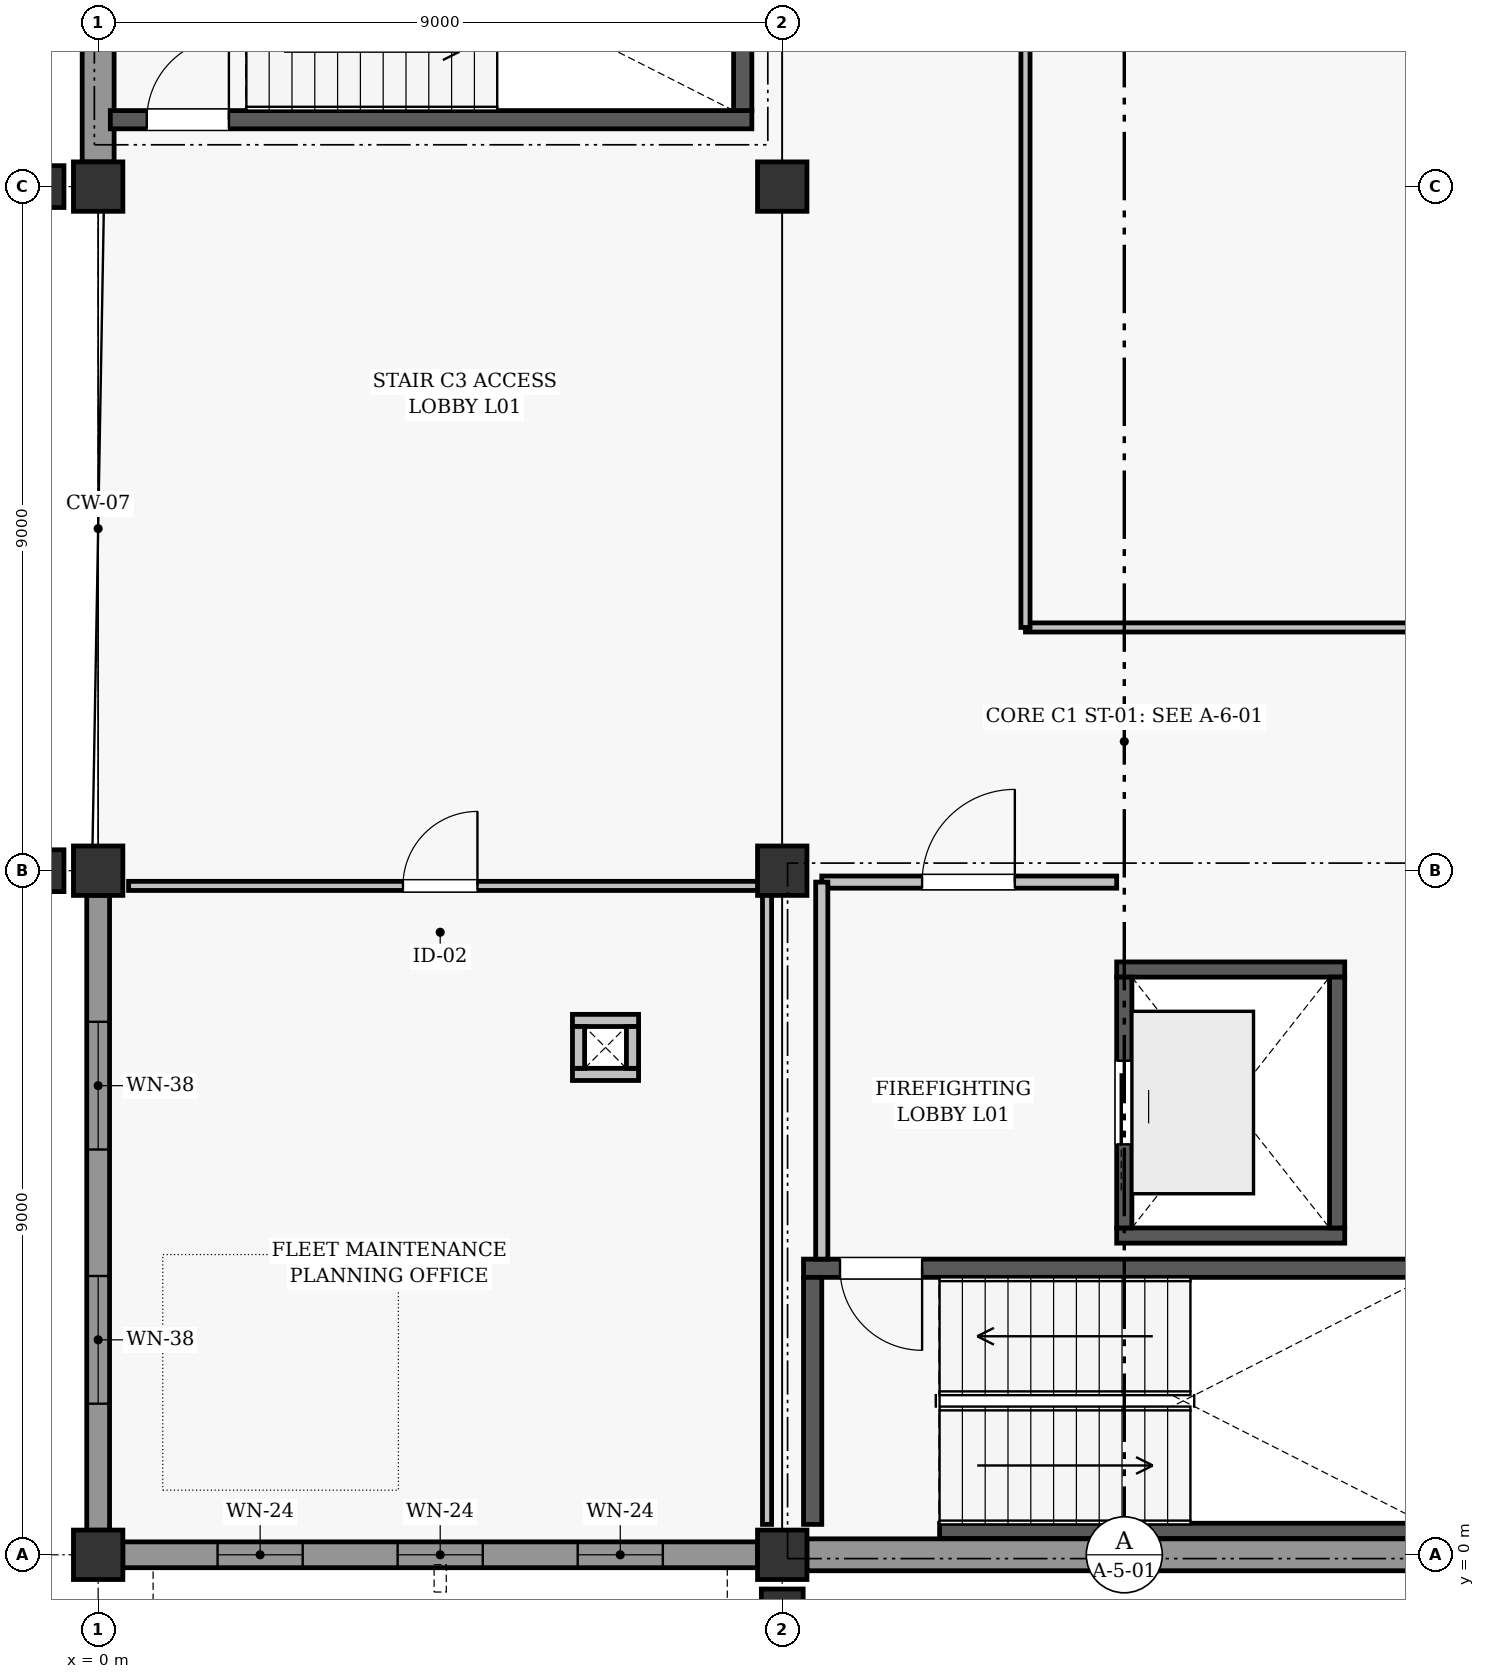
"""IFC4 building model, lengths in metres.
Left out: names, types, materials, properties, quantities, classifications, styles, units other than length and angle.
Written with IfcOpenShell. Run it as: python <this file> out.ifc"""

import sys

from ifc_helpers import new_model, si_unit, direction, frame, frame_2d, origin, origin_2d, place, context, subcontext, project, spatial, rectangle, extrude, element, fill, save


model = new_model("IFC4")
c1 = context("Model", 3, precision=1e-05, world=origin(), true_north=direction((0.0, 1.0)))
c2 = subcontext(c1, "Body", "Model", "MODEL_VIEW")
j1 = project(units=[si_unit("LENGTHUNIT", "METRE"), si_unit("PLANEANGLEUNIT", "RADIAN")], contexts=[c1])
p1 = place(None, origin())
s1 = spatial("IfcSite", under=j1, at=p1, CompositionType="ELEMENT")
p2 = place(p1, origin())
s2 = spatial("IfcBuilding", under=s1, at=p2, CompositionType="ELEMENT")
p3 = place(p2, frame((0.0, 0.0, 4.8)))
s3 = spatial("IfcBuildingStorey", under=s2, at=p3, CompositionType="ELEMENT", Elevation=4.8)
for number, where, z_axis, x_axis in (
    (1, (0.0, 0.0, 0.0), (0.0, 0.0, 1.0), (1.0, 0.0, 0.0)),
    (2, (0.0, 9.0, 0.0), (0.0, 0.0, 1.0), (1.0, 0.0, 0.0)),
    (3, (0.0, 18.0, 0.0), (0.0, 0.0, 1.0), (1.0, 0.0, 0.0)),
    (4, (9.0, 0.0, 0.0), (0.0, 0.0, 1.0), (1.0, 0.0, 0.0)),
    (5, (9.0, 9.0, 0.0), (0.0, 0.0, 1.0), (1.0, 0.0, 0.0)),
    (6, (9.0, 18.0, 0.0), (0.0, 0.0, 1.0), (1.0, 0.0, 0.0)),
):
    element("IfcColumn", number, at=place(p3, frame(where, z_axis=z_axis, x_axis=x_axis)), inside=s3, PredefinedType="COLUMN", context=c2, shape_type="SweptSolid", body=[
        extrude(rectangle(XDim=0.65, YDim=0.65, at=origin_2d()), origin(), (0.0, 0.0, 1.0), 3.6),
    ])
for number, where, z_axis, x_axis in (
    (7, (9.0, -0.85, 0.0), (0.0, 0.0, 1.0), (1.0, 0.0, 0.0)),
    (8, (-0.85, 9.0, 0.0), (0.0, 0.0, 1.0), (0.0, 1.0, 0.0)),
    (9, (-0.85, 18.0, 0.0), (0.0, 0.0, 1.0), (0.0, 1.0, 0.0)),
):
    element("IfcColumn", number, at=place(p3, frame(where, z_axis=z_axis, x_axis=x_axis)), inside=s3, PredefinedType="PILASTER", context=c2, shape_type="SweptSolid", body=[
        extrude(rectangle(XDim=0.55, YDim=0.8, at=origin_2d()), origin(), (0.0, 0.0, 1.0), 3.6),
    ])
p4 = place(p3, frame((0.323, 0.0, 0.0), z_axis=(0.0, 0.0, 1.0), x_axis=(1.0, 0.0, 0.0)))
e10 = element("IfcWall", 10, at=p4, inside=s3, PredefinedType="SOLIDWALL", context=c2, shape_type="SweptSolid", body=[
    extrude(rectangle(XDim=8.354, YDim=0.34, at=frame_2d((4.177, 0.0))), origin(), (0.0, 0.0, 1.0), 2.642),
])
p5 = place(p4, frame((1.248, 0.0, 0.8)))
e11 = element("IfcOpeningElement", 11, at=p5, cuts=e10, PredefinedType="OPENING", context=c2, shape_type="SweptSolid", body=[
    extrude(rectangle(XDim=1.12, YDim=1.08, at=frame_2d((0.56, 0.54))), frame((0.0, 0.18, 0.0), z_axis=(0.0, -1.0, 0.0), x_axis=(1.0, 0.0, 0.0)), (0.0, 0.0, 1.0), 0.36),
])
p6 = place(p4, frame((3.617, 0.0, 0.8)))
e12 = element("IfcOpeningElement", 12, at=p6, cuts=e10, PredefinedType="OPENING", context=c2, shape_type="SweptSolid", body=[
    extrude(rectangle(XDim=1.12, YDim=1.08, at=frame_2d((0.56, 0.54))), frame((0.0, 0.18, 0.0), z_axis=(0.0, -1.0, 0.0), x_axis=(1.0, 0.0, 0.0)), (0.0, 0.0, 1.0), 0.36),
])
p7 = place(p4, frame((5.986, 0.0, 0.8)))
e13 = element("IfcOpeningElement", 13, at=p7, cuts=e10, PredefinedType="OPENING", context=c2, shape_type="SweptSolid", body=[
    extrude(rectangle(XDim=1.12, YDim=1.08, at=frame_2d((0.56, 0.54))), frame((0.0, 0.18, 0.0), z_axis=(0.0, -1.0, 0.0), x_axis=(1.0, 0.0, 0.0)), (0.0, 0.0, 1.0), 0.36),
])
p8 = place(p3, frame((9.323, 0.0, 0.0), z_axis=(0.0, 0.0, 1.0), x_axis=(1.0, 0.0, 0.0)))
e14 = element("IfcWall", 14, at=p8, inside=s3, PredefinedType="SOLIDWALL", context=c2, shape_type="SweptSolid", body=[
    extrude(rectangle(XDim=8.354, YDim=0.42, at=frame_2d((4.177, 0.0))), origin(), (0.0, 0.0, 1.0), 2.642),
])
p9 = place(p3, frame((0.0, 0.323, 0.0), z_axis=(0.0, 0.0, 1.0), x_axis=(0.0, 1.0, 0.0)))
e15 = element("IfcWall", 15, at=p9, inside=s3, PredefinedType="SOLIDWALL", context=c2, shape_type="SweptSolid", body=[
    extrude(rectangle(XDim=8.354, YDim=0.3, at=frame_2d((4.177, 0.0))), origin(), (0.0, 0.0, 1.0), 2.842),
])
p10 = place(p9, frame((1.665, 0.0, 0.85)))
e16 = element("IfcOpeningElement", 16, at=p10, cuts=e15, PredefinedType="OPENING", context=c2, shape_type="SweptSolid", body=[
    extrude(rectangle(XDim=1.68, YDim=1.66, at=frame_2d((0.84, 0.83))), frame((0.0, 0.16, 0.0), z_axis=(0.0, -1.0, 0.0), x_axis=(1.0, 0.0, 0.0)), (0.0, 0.0, 1.0), 0.32),
])
p11 = place(p9, frame((5.009, 0.0, 0.85)))
e17 = element("IfcOpeningElement", 17, at=p11, cuts=e15, PredefinedType="OPENING", context=c2, shape_type="SweptSolid", body=[
    extrude(rectangle(XDim=1.68, YDim=1.66, at=frame_2d((0.84, 0.83))), frame((0.0, 0.16, 0.0), z_axis=(0.0, -1.0, 0.0), x_axis=(1.0, 0.0, 0.0)), (0.0, 0.0, 1.0), 0.32),
])
p12 = place(p3, frame((0.0, 18.323, 0.0), z_axis=(0.0, 0.0, 1.0), x_axis=(0.0, 1.0, 0.0)))
e18 = element("IfcWall", 18, at=p12, inside=s3, PredefinedType="SOLIDWALL", context=c2, shape_type="SweptSolid", body=[
    extrude(rectangle(XDim=8.354, YDim=0.42, at=frame_2d((4.177, 0.0))), origin(), (0.0, 0.0, 1.0), 2.842),
])
p13 = place(p3, frame((11.07, 0.315, 0.0), z_axis=(0.0, 0.0, 1.0), x_axis=(1.0, 0.0, 0.0)))
e19 = element("IfcWall", 19, at=p13, inside=s3, PredefinedType="SHEAR", context=c2, shape_type="SweptSolid", body=[
    extrude(rectangle(XDim=6.41, YDim=0.2, at=frame_2d((3.205, 0.0))), origin(), (0.0, 0.0, 1.0), 3.35),
])
p14 = place(p3, frame((9.28, 3.77, 0.0), z_axis=(0.0, 0.0, 1.0), x_axis=(1.0, 0.0, 0.0)))
e20 = element("IfcWall", 20, at=p14, inside=s3, PredefinedType="SHEAR", context=c2, shape_type="SweptSolid", body=[
    extrude(rectangle(XDim=8.44, YDim=0.24, at=frame_2d((4.22, 0.0))), origin(), (0.0, 0.0, 1.0), 3.35),
])
p15 = place(p14, frame((0.48, 0.0, 0.0)))
e21 = element("IfcOpeningElement", 21, at=p15, cuts=e20, PredefinedType="OPENING", context=c2, shape_type="SweptSolid", body=[
    extrude(rectangle(XDim=1.08, YDim=2.08, at=frame_2d((0.54, 1.04))), frame((0.0, 0.13, 0.0), z_axis=(0.0, -1.0, 0.0), x_axis=(1.0, 0.0, 0.0)), (0.0, 0.0, 1.0), 0.26),
])
p16 = place(p3, frame((9.4, 0.4, 0.0), z_axis=(0.0, 0.0, 1.0), x_axis=(0.0, 1.0, 0.0)))
e22 = element("IfcWall", 22, at=p16, inside=s3, PredefinedType="SHEAR", context=c2, shape_type="SweptSolid", body=[
    extrude(rectangle(XDim=3.25, YDim=0.24, at=frame_2d((1.625, 0.0))), origin(), (0.0, 0.0, 1.0), 3.35),
])
p17 = place(p3, frame((0.16, 18.88, 0.0), z_axis=(0.0, 0.0, 1.0), x_axis=(1.0, 0.0, 0.0)))
e23 = element("IfcWall", 23, at=p17, inside=s3, PredefinedType="SHEAR", context=c2, shape_type="SweptSolid", body=[
    extrude(rectangle(XDim=8.44, YDim=0.24, at=frame_2d((4.22, 0.0))), origin(), (0.0, 0.0, 1.0), 3.35),
])
p18 = place(p17, frame((0.48, 0.0, 0.0)))
e24 = element("IfcOpeningElement", 24, at=p18, cuts=e23, PredefinedType="OPENING", context=c2, shape_type="SweptSolid", body=[
    extrude(rectangle(XDim=1.08, YDim=2.08, at=frame_2d((0.54, 1.04))), frame((0.0, 0.13, 0.0), z_axis=(0.0, -1.0, 0.0), x_axis=(1.0, 0.0, 0.0)), (0.0, 0.0, 1.0), 0.26),
])
p19 = place(p3, frame((8.48, 19.0, 0.0), z_axis=(0.0, 0.0, 1.0), x_axis=(0.0, 1.0, 0.0)))
e25 = element("IfcWall", 25, at=p19, inside=s3, PredefinedType="SHEAR", context=c2, shape_type="SweptSolid", body=[
    extrude(rectangle(XDim=3.25, YDim=0.24, at=frame_2d((1.625, 0.0))), origin(), (0.0, 0.0, 1.0), 3.35),
])
for number, where, z_axis, x_axis in (
    (26, (13.4, 4.2, 0.0), (0.0, 0.0, 1.0), (1.0, 0.0, 0.0)),
    (27, (13.4, 7.7, 0.0), (0.0, 0.0, 1.0), (1.0, 0.0, 0.0)),
):
    element("IfcWall", number, at=place(p3, frame(where, z_axis=z_axis, x_axis=x_axis)), inside=s3, PredefinedType="SHEAR", context=c2, shape_type="SweptSolid", body=[
        extrude(rectangle(XDim=3.0, YDim=0.2, at=frame_2d((1.5, 0.0))), origin(), (0.0, 0.0, 1.0), 3.35),
    ])
p20 = place(p3, frame((13.5, 4.3, 0.0), z_axis=(0.0, 0.0, 1.0), x_axis=(0.0, 1.0, 0.0)))
e28 = element("IfcWall", 28, at=p20, inside=s3, PredefinedType="SHEAR", context=c2, shape_type="SweptSolid", body=[
    extrude(rectangle(XDim=3.3, YDim=0.2, at=frame_2d((1.65, 0.0))), origin(), (0.0, 0.0, 1.0), 3.35),
])
p21 = place(p20, frame((1.1, 0.0, 0.0)))
e29 = element("IfcOpeningElement", 29, at=p21, cuts=e28, PredefinedType="OPENING", context=c2, shape_type="SweptSolid", body=[
    extrude(rectangle(XDim=1.1, YDim=2.1, at=frame_2d((0.55, 1.05))), frame((0.0, 0.11, 0.0), z_axis=(0.0, -1.0, 0.0), x_axis=(1.0, 0.0, 0.0)), (0.0, 0.0, 1.0), 0.22),
])
p22 = place(p3, frame((16.3, 4.3, 0.0), z_axis=(0.0, 0.0, 1.0), x_axis=(0.0, 1.0, 0.0)))
e30 = element("IfcWall", 30, at=p22, inside=s3, PredefinedType="SHEAR", context=c2, shape_type="SweptSolid", body=[
    extrude(rectangle(XDim=3.3, YDim=0.2, at=frame_2d((1.65, 0.0))), origin(), (0.0, 0.0, 1.0), 3.35),
])
for number, where, z_axis, x_axis in (
    (31, (6.24, 6.32, 0.0), (0.0, 0.0, 1.0), (1.0, 0.0, 0.0)),
    (32, (6.24, 7.03, 0.0), (0.0, 0.0, 1.0), (1.0, 0.0, 0.0)),
):
    element("IfcWall", number, at=place(p3, frame(where, z_axis=z_axis, x_axis=x_axis)), inside=s3, PredefinedType="PARTITIONING", context=c2, shape_type="SweptSolid", body=[
        extrude(rectangle(XDim=0.87, YDim=0.16, at=frame_2d((0.435, 0.0))), origin(), (0.0, 0.0, 1.0), 3.35),
    ])
for number, where, z_axis, x_axis in (
    (33, (6.32, 6.4, 0.0), (0.0, 0.0, 1.0), (0.0, 1.0, 0.0)),
    (34, (7.03, 6.4, 0.0), (0.0, 0.0, 1.0), (0.0, 1.0, 0.0)),
):
    element("IfcWall", number, at=place(p3, frame(where, z_axis=z_axis, x_axis=x_axis)), inside=s3, PredefinedType="PARTITIONING", context=c2, shape_type="SweptSolid", body=[
        extrude(rectangle(XDim=0.55, YDim=0.16, at=frame_2d((0.275, 0.0))), origin(), (0.0, 0.0, 1.0), 3.35),
    ])
p23 = place(p3, frame((9.52, 8.85, 0.0), z_axis=(0.0, 0.0, 1.0), x_axis=(1.0, 0.0, 0.0)))
e35 = element("IfcWall", 35, at=p23, inside=s3, PredefinedType="PARTITIONING", context=c2, shape_type="SweptSolid", body=[
    extrude(rectangle(XDim=3.88, YDim=0.16, at=frame_2d((1.94, 0.0))), origin(), (0.0, 0.0, 1.0), 2.595),
])
p24 = place(p23, frame((1.32, 0.0, 0.0)))
e36 = element("IfcOpeningElement", 36, at=p24, cuts=e35, PredefinedType="OPENING", context=c2, shape_type="SweptSolid", body=[
    extrude(rectangle(XDim=1.22, YDim=2.12, at=frame_2d((0.61, 1.06))), frame((0.0, 0.09, 0.0), z_axis=(0.0, -1.0, 0.0), x_axis=(1.0, 0.0, 0.0)), (0.0, 0.0, 1.0), 0.18),
])
p25 = place(p3, frame((9.52, 3.89, 0.0), z_axis=(0.0, 0.0, 1.0), x_axis=(0.0, 1.0, 0.0)))
e37 = element("IfcWall", 37, at=p25, inside=s3, PredefinedType="PARTITIONING", context=c2, shape_type="SweptSolid", body=[
    extrude(rectangle(XDim=4.96, YDim=0.16, at=frame_2d((2.48, 0.0))), origin(), (0.0, 0.0, 1.0), 2.595),
])
p26 = place(p3, frame((0.4, 8.8, 0.0), z_axis=(0.0, 0.0, 1.0), x_axis=(1.0, 0.0, 0.0)))
e38 = element("IfcWall", 38, at=p26, inside=s3, PredefinedType="PARTITIONING", context=c2, shape_type="SweptSolid", body=[
    extrude(rectangle(XDim=8.4, YDim=0.12, at=frame_2d((4.2, 0.0))), origin(), (0.0, 0.0, 1.0), 2.595),
])
p27 = place(p26, frame((3.61, 0.0, 0.0)))
e39 = element("IfcOpeningElement", 39, at=p27, cuts=e38, PredefinedType="OPENING", context=c2, shape_type="SweptSolid", body=[
    extrude(rectangle(XDim=0.98, YDim=2.08, at=frame_2d((0.49, 1.04))), frame((0.0, 0.07, 0.0), z_axis=(0.0, -1.0, 0.0), x_axis=(1.0, 0.0, 0.0)), (0.0, 0.0, 1.0), 0.14),
])
p28 = place(p3, frame((8.8, 0.4, 0.0), z_axis=(0.0, 0.0, 1.0), x_axis=(0.0, 1.0, 0.0)))
e40 = element("IfcWall", 40, at=p28, inside=s3, PredefinedType="PARTITIONING", context=c2, shape_type="SweptSolid", body=[
    extrude(rectangle(XDim=8.4, YDim=0.12, at=frame_2d((4.2, 0.0))), origin(), (0.0, 0.0, 1.0), 2.595),
])
p29 = place(p3, frame((12.2, 12.2, 0.0), z_axis=(0.0, 0.0, 1.0), x_axis=(1.0, 0.0, 0.0)))
e41 = element("IfcWall", 41, at=p29, inside=s3, PredefinedType="PARTITIONING", context=c2, shape_type="SweptSolid", body=[
    extrude(rectangle(XDim=32.4, YDim=0.12, at=frame_2d((16.2, 0.0))), origin(), (0.0, 0.0, 1.0), 2.695),
])
p30 = place(p29, frame((9.49, 0.0, 0.0)))
e42 = element("IfcOpeningElement", 42, at=p30, cuts=e41, PredefinedType="OPENING", context=c2, shape_type="SweptSolid", body=[
    extrude(rectangle(XDim=1.62, YDim=2.14, at=frame_2d((0.81, 1.07))), frame((0.0, 0.07, 0.0), z_axis=(0.0, -1.0, 0.0), x_axis=(1.0, 0.0, 0.0)), (0.0, 0.0, 1.0), 0.14),
])
p31 = place(p3, frame((12.2, 12.2, 0.0), z_axis=(0.0, 0.0, 1.0), x_axis=(0.0, 1.0, 0.0)))
e43 = element("IfcWall", 43, at=p31, inside=s3, PredefinedType="PARTITIONING", context=c2, shape_type="SweptSolid", body=[
    extrude(rectangle(XDim=14.4, YDim=0.12, at=frame_2d((7.2, 0.0))), origin(), (0.0, 0.0, 1.0), 2.595),
])
p32 = place(p5, origin())
e44 = element("IfcWindow", 44, at=p32, inside=s3, PartitioningType="SINGLE_PANEL", PredefinedType="WINDOW", context=c2, shape_type="SweptSolid", body=[
    extrude(rectangle(XDim=1.12, YDim=1.08, at=frame_2d((0.56, 0.54))), frame((0.0, 0.03, 0.0), z_axis=(0.0, -1.0, 0.0), x_axis=(1.0, 0.0, 0.0)), (0.0, 0.0, 1.0), 0.06),
])
fill(e11, e44)
p33 = place(p6, origin())
e45 = element("IfcWindow", 45, at=p33, inside=s3, PartitioningType="SINGLE_PANEL", PredefinedType="WINDOW", context=c2, shape_type="SweptSolid", body=[
    extrude(rectangle(XDim=1.12, YDim=1.08, at=frame_2d((0.56, 0.54))), frame((0.0, 0.03, 0.0), z_axis=(0.0, -1.0, 0.0), x_axis=(1.0, 0.0, 0.0)), (0.0, 0.0, 1.0), 0.06),
])
fill(e12, e45)
p34 = place(p7, origin())
e46 = element("IfcWindow", 46, at=p34, inside=s3, PartitioningType="SINGLE_PANEL", PredefinedType="WINDOW", context=c2, shape_type="SweptSolid", body=[
    extrude(rectangle(XDim=1.12, YDim=1.08, at=frame_2d((0.56, 0.54))), frame((0.0, 0.03, 0.0), z_axis=(0.0, -1.0, 0.0), x_axis=(1.0, 0.0, 0.0)), (0.0, 0.0, 1.0), 0.06),
])
fill(e13, e46)
p35 = place(p10, origin())
e47 = element("IfcWindow", 47, at=p35, inside=s3, PartitioningType="SINGLE_PANEL", PredefinedType="WINDOW", context=c2, shape_type="SweptSolid", body=[
    extrude(rectangle(XDim=1.68, YDim=1.66, at=frame_2d((0.84, 0.83))), frame((0.0, 0.03, 0.0), z_axis=(0.0, -1.0, 0.0), x_axis=(1.0, 0.0, 0.0)), (0.0, 0.0, 1.0), 0.06),
])
fill(e16, e47)
p36 = place(p11, origin())
e48 = element("IfcWindow", 48, at=p36, inside=s3, PartitioningType="SINGLE_PANEL", PredefinedType="WINDOW", context=c2, shape_type="SweptSolid", body=[
    extrude(rectangle(XDim=1.68, YDim=1.66, at=frame_2d((0.84, 0.83))), frame((0.0, 0.03, 0.0), z_axis=(0.0, -1.0, 0.0), x_axis=(1.0, 0.0, 0.0)), (0.0, 0.0, 1.0), 0.06),
])
fill(e17, e48)
p37 = place(p15, frame((1.08, 0.0, 0.0), z_axis=(0.0, 0.0, 1.0), x_axis=(-1.0, 0.0, 0.0)))
e49 = element("IfcDoor", 49, at=p37, inside=s3, OperationType="SINGLE_SWING_RIGHT", PredefinedType="DOOR", context=c2, shape_type="SweptSolid", body=[
    extrude(rectangle(XDim=1.08, YDim=2.08, at=frame_2d((0.54, 1.04))), frame((0.0, 0.025, 0.0), z_axis=(0.0, -1.0, 0.0), x_axis=(1.0, 0.0, 0.0)), (0.0, 0.0, 1.0), 0.05),
])
fill(e21, e49)
p38 = place(p18, origin())
e50 = element("IfcDoor", 50, at=p38, inside=s3, OperationType="SINGLE_SWING_RIGHT", PredefinedType="DOOR", context=c2, shape_type="SweptSolid", body=[
    extrude(rectangle(XDim=1.08, YDim=2.08, at=frame_2d((0.54, 1.04))), frame((0.0, 0.025, 0.0), z_axis=(0.0, -1.0, 0.0), x_axis=(1.0, 0.0, 0.0)), (0.0, 0.0, 1.0), 0.05),
])
fill(e24, e50)
p39 = place(p21, origin())
e51 = element("IfcDoor", 51, at=p39, inside=s3, OperationType="SLIDING_TO_LEFT", PredefinedType="DOOR", context=c2, shape_type="SweptSolid", body=[
    extrude(rectangle(XDim=1.1, YDim=2.1, at=frame_2d((0.55, 1.05))), frame((0.0, 0.025, 0.0), z_axis=(0.0, -1.0, 0.0), x_axis=(1.0, 0.0, 0.0)), (0.0, 0.0, 1.0), 0.05),
])
fill(e29, e51)
p40 = place(p24, origin())
e52 = element("IfcDoor", 52, at=p40, inside=s3, OperationType="SINGLE_SWING_RIGHT", PredefinedType="DOOR", context=c2, shape_type="SweptSolid", body=[
    extrude(rectangle(XDim=1.22, YDim=2.12, at=frame_2d((0.61, 1.06))), frame((0.0, 0.025, 0.0), z_axis=(0.0, -1.0, 0.0), x_axis=(1.0, 0.0, 0.0)), (0.0, 0.0, 1.0), 0.05),
])
fill(e36, e52)
p41 = place(p27, origin())
e53 = element("IfcDoor", 53, at=p41, inside=s3, OperationType="SINGLE_SWING_RIGHT", PredefinedType="DOOR", context=c2, shape_type="SweptSolid", body=[
    extrude(rectangle(XDim=0.98, YDim=2.08, at=frame_2d((0.49, 1.04))), frame((0.0, 0.025, 0.0), z_axis=(0.0, -1.0, 0.0), x_axis=(1.0, 0.0, 0.0)), (0.0, 0.0, 1.0), 0.05),
])
fill(e39, e53)
save(model, sys.argv[1])
